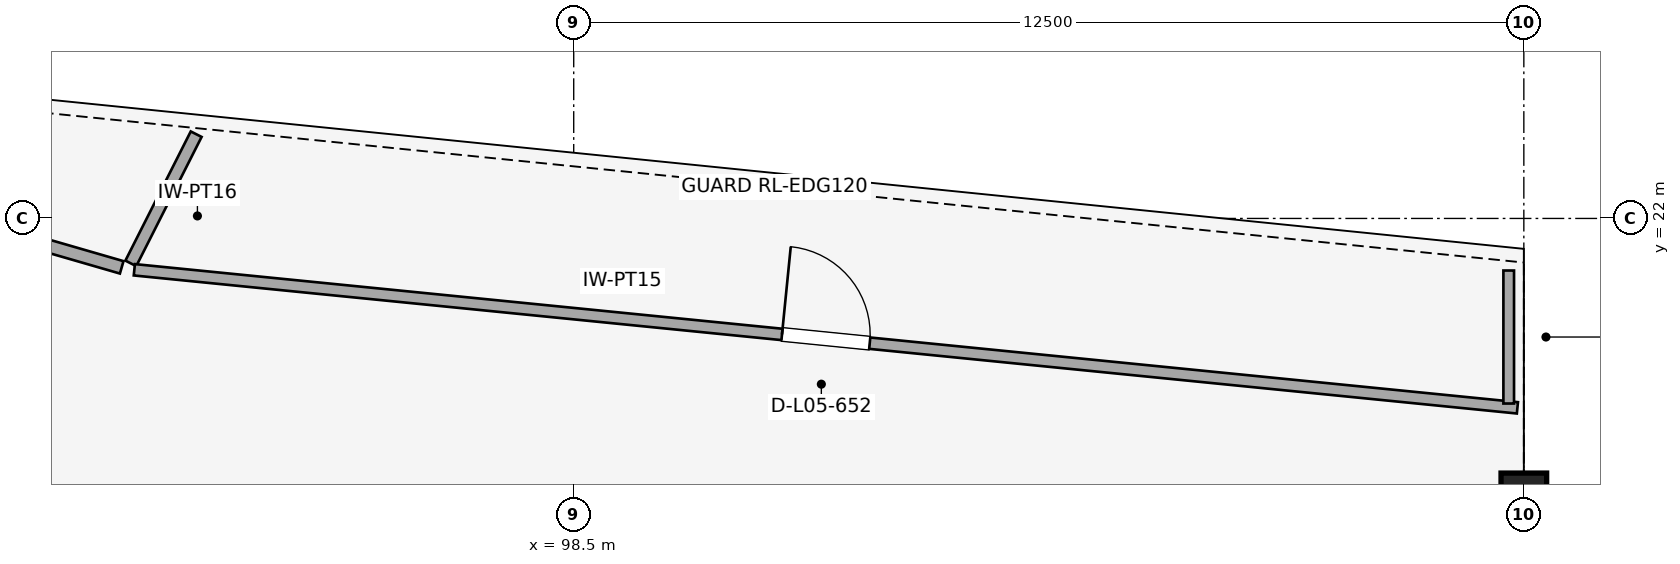
"""IFC4 building model, lengths in metres.
Left out: names, types, materials, properties, quantities, classifications, styles, units other than length and angle.
Written with IfcOpenShell. Run it as: python <this file> out.ifc"""

import sys

from ifc_helpers import new_model, si_unit, direction, frame, frame_2d, origin, origin_2d, place, context, subcontext, project, spatial, rectangle, i_section, extrude, element, fill, save


model = new_model("IFC4")
c1 = context("Model", 3, precision=1e-05, world=origin(), true_north=direction((0.0, 1.0)))
c2 = subcontext(c1, "Body", "Model", "MODEL_VIEW")
j1 = project(units=[si_unit("LENGTHUNIT", "METRE"), si_unit("PLANEANGLEUNIT", "RADIAN")], contexts=[c1])
p1 = place(None, origin())
s1 = spatial("IfcSite", under=j1, at=p1, CompositionType="ELEMENT")
p2 = place(p1, origin())
s2 = spatial("IfcBuilding", under=s1, at=p2, CompositionType="ELEMENT")
p3 = place(p2, frame((0.0, 0.0, 26.2)))
s3 = spatial("IfcBuildingStorey", under=s2, at=p3, CompositionType="ELEMENT", Elevation=26.2)
p4 = place(p3, frame((111.0, 18.5, 0.0), z_axis=(0.0, 0.0, 1.0), x_axis=(0.0, -1.0, 0.0)))
e1 = element("IfcColumn", 1, at=p4, inside=s3, PredefinedType="COLUMN", context=c2, shape_type="SweptSolid", body=[
    extrude(i_section(OverallWidth=0.3, OverallDepth=0.6, WebThickness=0.015, FlangeThickness=0.03, FilletRadius=0.027, at=origin_2d()), origin(), (0.0, 0.0, 1.0), 5.6),
])
p5 = place(p3, frame((83.946, 23.848, 0.0), z_axis=(0.0, 0.0, 1.0), x_axis=(0.960579584174, -0.278005148276, 0.0)))
e2 = element("IfcWall", 2, at=p5, inside=s3, PredefinedType="PARTITIONING", context=c2, shape_type="SweptSolid", body=[
    extrude(rectangle(XDim=8.96, YDim=0.17, at=frame_2d((4.48, 0.0))), origin(), (0.0, 0.0, 1.0), 4.1),
])
p6 = place(p5, frame((1.1, 0.0, 0.0)))
e3 = element("IfcOpeningElement", 3, at=p6, cuts=e2, PredefinedType="OPENING", context=c2, shape_type="SweptSolid", body=[
    extrude(rectangle(XDim=1.08, YDim=2.38, at=frame_2d((0.54, 1.19))), frame((0.0, 0.095, 0.0), z_axis=(0.0, -1.0, 0.0), x_axis=(1.0, 0.0, 0.0)), (0.0, 0.0, 1.0), 0.19),
])
p7 = place(p3, frame((93.533, 23.109, 0.0), z_axis=(0.0, 0.0, 1.0), x_axis=(-0.451514654863, -0.892263703422, 0.0)))
e4 = element("IfcWall", 4, at=p7, inside=s3, PredefinedType="PARTITIONING", context=c2, shape_type="SweptSolid", body=[
    extrude(rectangle(XDim=1.905, YDim=0.16, at=frame_2d((0.953, 0.0))), origin(), (0.0, 0.0, 1.0), 4.1),
])
p8 = place(p3, frame((92.719, 21.325, 0.0), z_axis=(0.0, 0.0, 1.0), x_axis=(0.995054359901, -0.099331872235, 0.0)))
e5 = element("IfcWall", 5, at=p8, inside=s3, PredefinedType="PARTITIONING", context=c2, shape_type="SweptSolid", body=[
    extrude(rectangle(XDim=18.286, YDim=0.15, at=frame_2d((9.143, 0.0))), origin(), (0.0, 0.0, 1.0), 4.1),
])
p9 = place(p8, frame((8.563, 0.0, 0.0)))
e6 = element("IfcOpeningElement", 6, at=p9, cuts=e5, PredefinedType="OPENING", context=c2, shape_type="SweptSolid", body=[
    extrude(rectangle(XDim=1.16, YDim=2.24, at=frame_2d((0.58, 1.12))), frame((0.0, 0.085, 0.0), z_axis=(0.0, -1.0, 0.0), x_axis=(1.0, 0.0, 0.0)), (0.0, 0.0, 1.0), 0.17),
])
p10 = place(p3, frame((110.801, 21.315, 0.0), z_axis=(0.0, 0.0, 1.0), x_axis=(0.0, -1.0, 0.0)))
e7 = element("IfcWall", 7, at=p10, inside=s3, PredefinedType="PARTITIONING", context=c2, shape_type="SweptSolid", body=[
    extrude(rectangle(XDim=1.75, YDim=0.14, at=frame_2d((0.875, 0.0))), origin(), (0.0, 0.0, 1.0), 4.1),
])
p11 = place(p9, origin())
e8 = element("IfcDoor", 8, at=p11, inside=s3, OperationType="SINGLE_SWING_LEFT", PredefinedType="DOOR", context=c2, shape_type="SweptSolid", body=[
    extrude(rectangle(XDim=1.16, YDim=2.24, at=frame_2d((0.58, 1.12))), frame((0.0, 0.025, 0.0), z_axis=(0.0, -1.0, 0.0), x_axis=(1.0, 0.0, 0.0)), (0.0, 0.0, 1.0), 0.05),
])
fill(e6, e8)
save(model, sys.argv[1])
